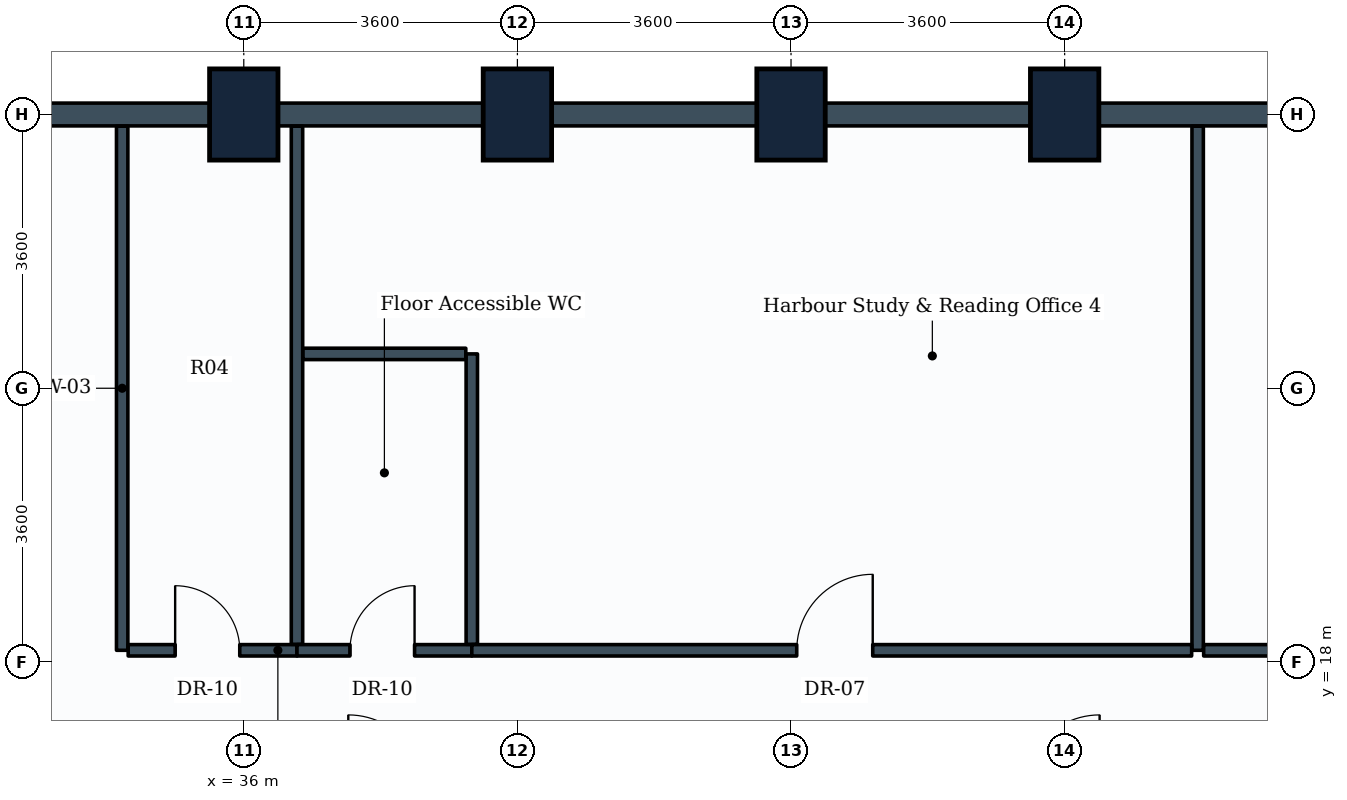
"""IFC4 building model, lengths in metres.
Left out: names, types, materials, properties, quantities, classifications, styles, units other than length and angle.
Written with IfcOpenShell. Run it as: python <this file> out.ifc"""

import sys

from ifc_helpers import new_model, si_unit, direction, frame, frame_2d, origin, origin_2d, place, context, subcontext, project, spatial, rectangle, extrude, element, fill, save


model = new_model("IFC4")
c1 = context("Model", 3, precision=1e-05, world=origin(), true_north=direction((0.0, 1.0)))
c2 = subcontext(c1, "Body", "Model", "MODEL_VIEW")
j1 = project(units=[si_unit("LENGTHUNIT", "METRE"), si_unit("PLANEANGLEUNIT", "RADIAN")], contexts=[c1])
p1 = place(None, origin())
s1 = spatial("IfcSite", under=j1, at=p1, CompositionType="ELEMENT")
p2 = place(p1, origin())
s2 = spatial("IfcBuilding", under=s1, at=p2, CompositionType="ELEMENT")
p3 = place(p2, frame((0.0, 0.0, 59.1)))
s3 = spatial("IfcBuildingStorey", under=s2, at=p3, CompositionType="ELEMENT", Elevation=59.1)
for number, where, z_axis, x_axis in (
    (1, (36.0, 25.2, 0.0), (0.0, 0.0, 1.0), (1.0, 0.0, 0.0)),
    (2, (39.6, 25.2, 0.0), (0.0, 0.0, 1.0), (1.0, 0.0, 0.0)),
    (3, (43.2, 25.2, 0.0), (0.0, 0.0, 1.0), (1.0, 0.0, 0.0)),
    (4, (46.8, 25.2, 0.0), (0.0, 0.0, 1.0), (1.0, 0.0, 0.0)),
):
    element("IfcColumn", number, at=place(p3, frame(where, z_axis=z_axis, x_axis=x_axis)), inside=s3, PredefinedType="COLUMN", context=c2, shape_type="SweptSolid", body=[
        extrude(rectangle(XDim=0.9, YDim=1.2, at=origin_2d()), origin(), (0.0, 0.0, 1.0), 3.9),
    ])
p4 = place(p3, frame((46.8, 25.2, 0.0), z_axis=(0.0, 0.0, 1.0), x_axis=(1.0, 0.0, 0.0)))
e5 = element("IfcWall", 5, at=p4, inside=s3, PredefinedType="STANDARD", context=c2, shape_type="SweptSolid", body=[
    extrude(rectangle(XDim=3.6, YDim=0.3, at=frame_2d((1.8, 0.0))), origin(), (0.0, 0.0, 1.0), 2.93),
])
p5 = place(p3, frame((43.2, 25.2, 0.0), z_axis=(0.0, 0.0, 1.0), x_axis=(1.0, 0.0, 0.0)))
e6 = element("IfcWall", 6, at=p5, inside=s3, PredefinedType="STANDARD", context=c2, shape_type="SweptSolid", body=[
    extrude(rectangle(XDim=3.6, YDim=0.3, at=frame_2d((1.8, 0.0))), origin(), (0.0, 0.0, 1.0), 2.93),
])
p6 = place(p3, frame((39.6, 25.2, 0.0), z_axis=(0.0, 0.0, 1.0), x_axis=(1.0, 0.0, 0.0)))
e7 = element("IfcWall", 7, at=p6, inside=s3, PredefinedType="STANDARD", context=c2, shape_type="SweptSolid", body=[
    extrude(rectangle(XDim=3.6, YDim=0.3, at=frame_2d((1.8, 0.0))), origin(), (0.0, 0.0, 1.0), 2.93),
])
for number, where, z_axis, x_axis in (
    (8, (36.0, 25.2, 0.0), (0.0, 0.0, 1.0), (1.0, 0.0, 0.0)),
    (9, (32.4, 25.2, 0.0), (0.0, 0.0, 1.0), (1.0, 0.0, 0.0)),
):
    element("IfcWall", number, at=place(p3, frame(where, z_axis=z_axis, x_axis=x_axis)), inside=s3, PredefinedType="STANDARD", context=c2, shape_type="SweptSolid", body=[
        extrude(rectangle(XDim=3.6, YDim=0.3, at=frame_2d((1.8, 0.0))), origin(), (0.0, 0.0, 1.0), 2.93),
    ])
p7 = place(p3, frame((34.4, 18.15, 0.0), z_axis=(0.0, 0.0, 1.0), x_axis=(0.0, 1.0, 0.0)))
e10 = element("IfcWall", 10, at=p7, inside=s3, PredefinedType="PARTITIONING", context=c2, shape_type="SweptSolid", body=[
    extrude(rectangle(XDim=6.896, YDim=0.15, at=frame_2d((3.448, 0.0))), origin(), (0.0, 0.0, 1.0), 2.93),
])
p8 = place(p3, frame((34.479, 18.15, 0.0), z_axis=(0.0, 0.0, 1.0), x_axis=(1.0, 0.0, 0.0)))
e11 = element("IfcWall", 11, at=p8, inside=s3, PredefinedType="PARTITIONING", context=c2, shape_type="SweptSolid", body=[
    extrude(rectangle(XDim=2.221, YDim=0.15, at=frame_2d((1.11, 0.0))), origin(), (0.0, 0.0, 1.0), 3.08),
])
p9 = place(p8, frame((0.618, 0.0, 0.0)))
e12 = element("IfcOpeningElement", 12, at=p9, cuts=e11, PredefinedType="OPENING", context=c2, shape_type="SweptSolid", body=[
    extrude(rectangle(XDim=0.85, YDim=2.1, at=frame_2d((0.425, 1.05))), frame((0.0, 0.085, 0.0), z_axis=(0.0, -1.0, 0.0), x_axis=(1.0, 0.0, 0.0)), (0.0, 0.0, 1.0), 0.17),
])
p10 = place(p3, frame((36.7, 18.229, 0.0), z_axis=(0.0, 0.0, 1.0), x_axis=(0.0, 1.0, 0.0)))
e13 = element("IfcWall", 13, at=p10, inside=s3, PredefinedType="PARTITIONING", context=c2, shape_type="SweptSolid", body=[
    extrude(rectangle(XDim=6.817, YDim=0.15, at=frame_2d((3.408, 0.0))), origin(), (0.0, 0.0, 1.0), 2.93),
])
p11 = place(p3, frame((36.7, 18.15, 0.0), z_axis=(0.0, 0.0, 1.0), x_axis=(1.0, 0.0, 0.0)))
e14 = element("IfcWall", 14, at=p11, inside=s3, PredefinedType="PARTITIONING", context=c2, shape_type="SweptSolid", body=[
    extrude(rectangle(XDim=2.3, YDim=0.15, at=frame_2d((1.15, 0.0))), origin(), (0.0, 0.0, 1.0), 3.08),
])
p12 = place(p11, frame((0.697, 0.0, 0.0)))
e15 = element("IfcOpeningElement", 15, at=p12, cuts=e14, PredefinedType="OPENING", context=c2, shape_type="SweptSolid", body=[
    extrude(rectangle(XDim=0.85, YDim=2.1, at=frame_2d((0.425, 1.05))), frame((0.0, 0.085, 0.0), z_axis=(0.0, -1.0, 0.0), x_axis=(1.0, 0.0, 0.0)), (0.0, 0.0, 1.0), 0.17),
])
p13 = place(p3, frame((39.0, 18.229, 0.0), z_axis=(0.0, 0.0, 1.0), x_axis=(0.0, 1.0, 0.0)))
e16 = element("IfcWall", 16, at=p13, inside=s3, PredefinedType="PARTITIONING", context=c2, shape_type="SweptSolid", body=[
    extrude(rectangle(XDim=3.821, YDim=0.15, at=frame_2d((1.911, 0.0))), origin(), (0.0, 0.0, 1.0), 3.03),
])
p14 = place(p3, frame((36.779, 22.05, 0.0), z_axis=(0.0, 0.0, 1.0), x_axis=(1.0, 0.0, 0.0)))
e17 = element("IfcWall", 17, at=p14, inside=s3, PredefinedType="PARTITIONING", context=c2, shape_type="SweptSolid", body=[
    extrude(rectangle(XDim=2.142, YDim=0.15, at=frame_2d((1.071, 0.0))), origin(), (0.0, 0.0, 1.0), 3.635),
])
p15 = place(p3, frame((48.55, 18.15, 0.0), z_axis=(0.0, 0.0, 1.0), x_axis=(0.0, 1.0, 0.0)))
e18 = element("IfcWall", 18, at=p15, inside=s3, PredefinedType="PARTITIONING", context=c2, shape_type="SweptSolid", body=[
    extrude(rectangle(XDim=6.896, YDim=0.15, at=frame_2d((3.448, 0.0))), origin(), (0.0, 0.0, 1.0), 2.93),
])
p16 = place(p3, frame((39.0, 18.15, 0.0), z_axis=(0.0, 0.0, 1.0), x_axis=(1.0, 0.0, 0.0)))
e19 = element("IfcWall", 19, at=p16, inside=s3, PredefinedType="PARTITIONING", context=c2, shape_type="SweptSolid", body=[
    extrude(rectangle(XDim=9.471, YDim=0.15, at=frame_2d((4.735, 0.0))), origin(), (0.0, 0.0, 1.0), 3.03),
])
p17 = place(p16, frame((4.275, 0.0, 0.0)))
e20 = element("IfcOpeningElement", 20, at=p17, cuts=e19, PredefinedType="OPENING", context=c2, shape_type="SweptSolid", body=[
    extrude(rectangle(XDim=1.0, YDim=2.1, at=frame_2d((0.5, 1.05))), frame((0.0, 0.085, 0.0), z_axis=(0.0, -1.0, 0.0), x_axis=(1.0, 0.0, 0.0)), (0.0, 0.0, 1.0), 0.17),
])
p18 = place(p3, frame((48.629, 18.15, 0.0), z_axis=(0.0, 0.0, 1.0), x_axis=(1.0, 0.0, 0.0)))
e21 = element("IfcWall", 21, at=p18, inside=s3, PredefinedType="PARTITIONING", context=c2, shape_type="SweptSolid", body=[
    extrude(rectangle(XDim=12.417, YDim=0.15, at=frame_2d((6.208, 0.0))), origin(), (0.0, 0.0, 1.0), 2.93),
])
p19 = place(p18, frame((5.706, 0.0, 0.0)))
e22 = element("IfcOpeningElement", 22, at=p19, cuts=e21, PredefinedType="OPENING", context=c2, shape_type="SweptSolid", body=[
    extrude(rectangle(XDim=1.0, YDim=2.1, at=frame_2d((0.5, 1.05))), frame((0.0, 0.085, 0.0), z_axis=(0.0, -1.0, 0.0), x_axis=(1.0, 0.0, 0.0)), (0.0, 0.0, 1.0), 0.17),
])
p20 = place(p9, origin())
e23 = element("IfcDoor", 23, at=p20, inside=s3, OperationType="SINGLE_SWING_LEFT", PredefinedType="DOOR", context=c2, shape_type="SweptSolid", body=[
    extrude(rectangle(XDim=0.85, YDim=2.1, at=frame_2d((0.425, 1.05))), frame((0.0, 0.025, 0.0), z_axis=(0.0, -1.0, 0.0), x_axis=(1.0, 0.0, 0.0)), (0.0, 0.0, 1.0), 0.05),
])
fill(e12, e23)
p21 = place(p12, origin())
e24 = element("IfcDoor", 24, at=p21, inside=s3, OperationType="SINGLE_SWING_RIGHT", PredefinedType="DOOR", context=c2, shape_type="SweptSolid", body=[
    extrude(rectangle(XDim=0.85, YDim=2.1, at=frame_2d((0.425, 1.05))), frame((0.0, 0.025, 0.0), z_axis=(0.0, -1.0, 0.0), x_axis=(1.0, 0.0, 0.0)), (0.0, 0.0, 1.0), 0.05),
])
fill(e15, e24)
p22 = place(p17, origin())
e25 = element("IfcDoor", 25, at=p22, inside=s3, OperationType="SINGLE_SWING_RIGHT", PredefinedType="DOOR", context=c2, shape_type="SweptSolid", body=[
    extrude(rectangle(XDim=1.0, YDim=2.1, at=frame_2d((0.5, 1.05))), frame((0.0, 0.025, 0.0), z_axis=(0.0, -1.0, 0.0), x_axis=(1.0, 0.0, 0.0)), (0.0, 0.0, 1.0), 0.05),
])
fill(e20, e25)
save(model, sys.argv[1])
